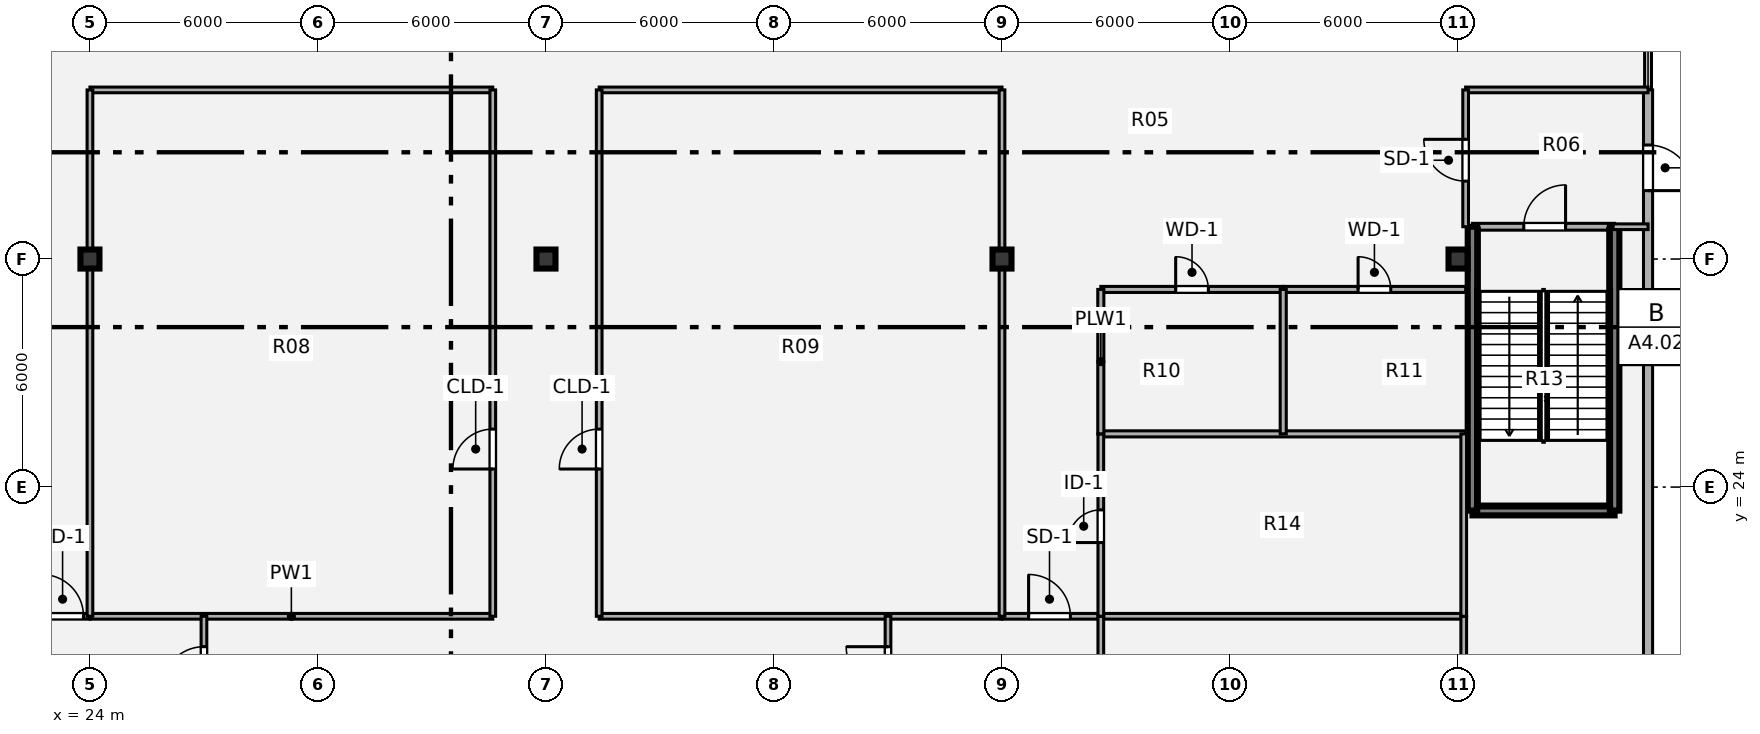
"""IFC4 building model, lengths in metres.
Left out: names, types, materials, properties, quantities, classifications, styles, units other than length and angle.
Written with IfcOpenShell. Run it as: python <this file> out.ifc"""

import sys

from ifc_helpers import new_model, si_unit, direction, frame, frame_2d, origin, origin_2d, place, context, subcontext, project, spatial, rectangle, i_section, extrude, source, transform, mapped, element, fill, save


model = new_model("IFC4")
c1 = context("Model", 3, precision=1e-05, world=origin(), true_north=direction((0.0, 1.0)))
c2 = subcontext(c1, "Body", "Model", "MODEL_VIEW")
j1 = project(units=[si_unit("LENGTHUNIT", "METRE"), si_unit("PLANEANGLEUNIT", "RADIAN")], contexts=[c1])
p1 = place(None, origin())
s1 = spatial("IfcSite", under=j1, at=p1, CompositionType="ELEMENT")
p2 = place(p1, origin())
s2 = spatial("IfcBuilding", under=s1, at=p2, CompositionType="ELEMENT")
p3 = place(p2, origin())
s3 = spatial("IfcBuildingStorey", under=s2, at=p3, CompositionType="ELEMENT", Elevation=0.0)
m1 = source(origin(), c2, "Body", "SweptSolid", [
    extrude(i_section(OverallWidth=0.5, OverallDepth=0.5, WebThickness=0.028, FlangeThickness=0.045, at=origin_2d()), origin(), (0.0, 0.0, 1.0), 5.4),
])
for number, where, z_axis, x_axis in (
    (1, (24.0, 30.0, 0.0), (0.0, 0.0, 1.0), (1.0, 0.0, 0.0)),
    (2, (36.0, 30.0, 0.0), (0.0, 0.0, 1.0), (1.0, 0.0, 0.0)),
    (3, (48.0, 30.0, 0.0), (0.0, 0.0, 1.0), (1.0, 0.0, 0.0)),
    (4, (60.0, 30.0, 0.0), (0.0, 0.0, 1.0), (1.0, 0.0, 0.0)),
):
    element("IfcColumn", number, at=place(p3, frame(where, z_axis=z_axis, x_axis=x_axis)), inside=s3, PredefinedType="COLUMN", context=c2, shape_type="MappedRepresentation", body=[
        mapped(m1, transform((0.0, 0.0, 0.0), x_axis=(1.0, 0.0, 0.0), y_axis=(0.0, 1.0, 0.0), z_axis=(0.0, 0.0, 1.0), scale=1.0)),
    ])
p4 = place(p3, frame((65.0, 34.45, 0.0), z_axis=(0.0, 0.0, 1.0), x_axis=(0.0, -1.0, 0.0)))
e5 = element("IfcWall", 5, at=p4, inside=s3, PredefinedType="SOLIDWALL", context=c2, shape_type="SweptSolid", body=[
    extrude(rectangle(XDim=28.85, YDim=0.24, at=frame_2d((14.425, 0.0))), origin(), (0.0, 0.0, 1.0), 5.12),
])
p5 = place(p4, frame((1.45, 0.0, 0.0)))
e6 = element("IfcOpeningElement", 6, at=p5, cuts=e5, PredefinedType="OPENING", context=c2, shape_type="SweptSolid", body=[
    extrude(rectangle(XDim=1.2, YDim=2.2, at=origin_2d()), frame((0.6, 0.13, 1.1), z_axis=(0.0, -1.0, 0.0), x_axis=(1.0, 0.0, 0.0)), (0.0, 0.0, 1.0), 0.26),
])
p6 = place(p3, frame((60.38, 30.85, 0.0), z_axis=(0.0, 0.0, 1.0), x_axis=(1.0, 0.0, 0.0)))
e7 = element("IfcWall", 7, at=p6, inside=s3, PredefinedType="PARTITIONING", context=c2, shape_type="SweptSolid", body=[
    extrude(rectangle(XDim=3.74, YDim=0.18, at=frame_2d((1.87, 0.0))), origin(), (0.0, 0.0, 1.0), 5.12),
])
p7 = place(p6, frame((1.35, 0.0, 0.0)))
e8 = element("IfcOpeningElement", 8, at=p7, cuts=e7, PredefinedType="OPENING", context=c2, shape_type="SweptSolid", body=[
    extrude(rectangle(XDim=1.1, YDim=2.1, at=origin_2d()), frame((0.55, 0.1, 1.05), z_axis=(0.0, -1.0, 0.0), x_axis=(1.0, 0.0, 0.0)), (0.0, 0.0, 1.0), 0.2),
])
p8 = place(p3, frame((60.38, 23.38, 0.0), z_axis=(0.0, 0.0, 1.0), x_axis=(1.0, 0.0, 0.0)))
e9 = element("IfcWall", 9, at=p8, inside=s3, PredefinedType="SHEAR", context=c2, shape_type="SweptSolid", body=[
    extrude(rectangle(XDim=3.74, YDim=0.25, at=frame_2d((1.87, 0.0))), origin(), (0.0, 0.0, 1.0), 5.4),
])
for number, where, z_axis, x_axis in (
    (10, (60.38, 23.38, 0.0), (0.0, 0.0, 1.0), (0.0, 1.0, 0.0)),
    (11, (64.12, 23.38, 0.0), (0.0, 0.0, 1.0), (0.0, 1.0, 0.0)),
):
    element("IfcWall", number, at=place(p3, frame(where, z_axis=z_axis, x_axis=x_axis)), inside=s3, PredefinedType="SHEAR", context=c2, shape_type="SweptSolid", body=[
        extrude(rectangle(XDim=7.47, YDim=0.25, at=frame_2d((3.735, 0.0))), origin(), (0.0, 0.0, 1.0), 5.4),
    ])
p9 = place(p3, frame((19.45, 20.6, 0.0), z_axis=(0.0, 0.0, 1.0), x_axis=(1.0, 0.0, 0.0)))
e12 = element("IfcWall", 12, at=p9, inside=s3, PredefinedType="PARTITIONING", context=c2, shape_type="SweptSolid", body=[
    extrude(rectangle(XDim=4.55, YDim=0.15, at=frame_2d((2.275, 0.0))), origin(), (0.0, 0.0, 1.0), 3.579),
])
p10 = place(p9, frame((3.28, 0.0, 0.0)))
e13 = element("IfcOpeningElement", 13, at=p10, cuts=e12, PredefinedType="OPENING", context=c2, shape_type="SweptSolid", body=[
    extrude(rectangle(XDim=1.1, YDim=2.1, at=origin_2d()), frame((0.55, 0.085, 1.05), z_axis=(0.0, -1.0, 0.0), x_axis=(1.0, 0.0, 0.0)), (0.0, 0.0, 1.0), 0.17),
])
for number, where, z_axis, x_axis in (
    (14, (24.0, 20.6, 0.0), (0.0, 0.0, 1.0), (1.0, 0.0, 0.0)),
    (15, (37.4, 20.6, 0.0), (0.0, 0.0, 1.0), (1.0, 0.0, 0.0)),
):
    element("IfcWall", number, at=place(p3, frame(where, z_axis=z_axis, x_axis=x_axis)), inside=s3, PredefinedType="PARTITIONING", context=c2, shape_type="SweptSolid", body=[
        extrude(rectangle(XDim=10.6, YDim=0.15, at=frame_2d((5.3, 0.0))), origin(), (0.0, 0.0, 1.0), 5.09),
    ])
p11 = place(p3, frame((48.0, 20.6, 0.0), z_axis=(0.0, 0.0, 1.0), x_axis=(1.0, 0.0, 0.0)))
e16 = element("IfcWall", 16, at=p11, inside=s3, PredefinedType="PARTITIONING", context=c2, shape_type="SweptSolid", body=[
    extrude(rectangle(XDim=2.6, YDim=0.15, at=frame_2d((1.3, 0.0))), origin(), (0.0, 0.0, 1.0), 5.09),
])
p12 = place(p11, frame((0.7, 0.0, 0.0)))
e17 = element("IfcOpeningElement", 17, at=p12, cuts=e16, PredefinedType="OPENING", context=c2, shape_type="SweptSolid", body=[
    extrude(rectangle(XDim=1.1, YDim=2.1, at=origin_2d()), frame((0.55, 0.085, 1.05), z_axis=(0.0, -1.0, 0.0), x_axis=(1.0, 0.0, 0.0)), (0.0, 0.0, 1.0), 0.17),
])
p13 = place(p3, frame((50.6, 20.6, 0.0), z_axis=(0.0, 0.0, 1.0), x_axis=(1.0, 0.0, 0.0)))
e18 = element("IfcWall", 18, at=p13, inside=s3, PredefinedType="PARTITIONING", context=c2, shape_type="SweptSolid", body=[
    extrude(rectangle(XDim=9.55, YDim=0.15, at=frame_2d((4.775, 0.0))), origin(), (0.0, 0.0, 1.0), 5.09),
])
p14 = place(p3, frame((50.6, 25.4, 0.0), z_axis=(0.0, 0.0, 1.0), x_axis=(1.0, 0.0, 0.0)))
e19 = element("IfcWall", 19, at=p14, inside=s3, PredefinedType="PLUMBINGWALL", context=c2, shape_type="SweptSolid", body=[
    extrude(rectangle(XDim=9.6, YDim=0.16, at=frame_2d((4.8, 0.0))), origin(), (0.0, 0.0, 1.0), 5.09),
])
p15 = place(p3, frame((50.6, 29.2, 0.0), z_axis=(0.0, 0.0, 1.0), x_axis=(1.0, 0.0, 0.0)))
e20 = element("IfcWall", 20, at=p15, inside=s3, PredefinedType="PLUMBINGWALL", context=c2, shape_type="SweptSolid", body=[
    extrude(rectangle(XDim=4.8, YDim=0.16, at=frame_2d((2.4, 0.0))), origin(), (0.0, 0.0, 1.0), 5.09),
])
p16 = place(p15, frame((1.97, 0.0, 0.0)))
e21 = element("IfcOpeningElement", 21, at=p16, cuts=e20, PredefinedType="OPENING", context=c2, shape_type="SweptSolid", body=[
    extrude(rectangle(XDim=0.86, YDim=2.1, at=origin_2d()), frame((0.43, 0.09, 1.05), z_axis=(0.0, -1.0, 0.0), x_axis=(1.0, 0.0, 0.0)), (0.0, 0.0, 1.0), 0.18),
])
p17 = place(p3, frame((55.4, 29.2, 0.0), z_axis=(0.0, 0.0, 1.0), x_axis=(1.0, 0.0, 0.0)))
e22 = element("IfcWall", 22, at=p17, inside=s3, PredefinedType="PLUMBINGWALL", context=c2, shape_type="SweptSolid", body=[
    extrude(rectangle(XDim=4.8, YDim=0.16, at=frame_2d((2.4, 0.0))), origin(), (0.0, 0.0, 1.0), 5.09),
])
p18 = place(p17, frame((1.97, 0.0, 0.0)))
e23 = element("IfcOpeningElement", 23, at=p18, cuts=e22, PredefinedType="OPENING", context=c2, shape_type="SweptSolid", body=[
    extrude(rectangle(XDim=0.86, YDim=2.1, at=origin_2d()), frame((0.43, 0.09, 1.05), z_axis=(0.0, -1.0, 0.0), x_axis=(1.0, 0.0, 0.0)), (0.0, 0.0, 1.0), 0.18),
])
p19 = place(p3, frame((64.08, 30.85, 0.0), z_axis=(0.0, 0.0, 1.0), x_axis=(1.0, 0.0, 0.0)))
e24 = element("IfcWall", 24, at=p19, inside=s3, PredefinedType="PARTITIONING", context=c2, shape_type="SweptSolid", body=[
    extrude(rectangle(XDim=0.92, YDim=0.15, at=frame_2d((0.46, 0.0))), origin(), (0.0, 0.0, 1.0), 5.09),
])
for number, where, z_axis, x_axis in (
    (25, (24.0, 34.45, 0.0), (0.0, 0.0, 1.0), (1.0, 0.0, 0.0)),
    (26, (37.4, 34.45, 0.0), (0.0, 0.0, 1.0), (1.0, 0.0, 0.0)),
):
    element("IfcWall", number, at=place(p3, frame(where, z_axis=z_axis, x_axis=x_axis)), inside=s3, PredefinedType="PARTITIONING", context=c2, shape_type="SweptSolid", body=[
        extrude(rectangle(XDim=10.6, YDim=0.15, at=frame_2d((5.3, 0.0))), origin(), (0.0, 0.0, 1.0), 5.09),
    ])
p20 = place(p3, frame((60.2, 34.45, 0.0), z_axis=(0.0, 0.0, 1.0), x_axis=(1.0, 0.0, 0.0)))
e27 = element("IfcWall", 27, at=p20, inside=s3, PredefinedType="PARTITIONING", context=c2, shape_type="SweptSolid", body=[
    extrude(rectangle(XDim=4.8, YDim=0.15, at=frame_2d((2.4, 0.0))), origin(), (0.0, 0.0, 1.0), 5.09),
])
p21 = place(p3, frame((24.0, 20.6, 0.0), z_axis=(0.0, 0.0, 1.0), x_axis=(0.0, 1.0, 0.0)))
e28 = element("IfcWall", 28, at=p21, inside=s3, PredefinedType="PARTITIONING", context=c2, shape_type="SweptSolid", body=[
    extrude(rectangle(XDim=13.85, YDim=0.15, at=frame_2d((6.925, 0.0))), origin(), (0.0, 0.0, 1.0), 4.305),
])
p22 = place(p3, frame((27.0, 18.0, 0.0), z_axis=(0.0, 0.0, 1.0), x_axis=(0.0, 1.0, 0.0)))
e29 = element("IfcWall", 29, at=p22, inside=s3, PredefinedType="PARTITIONING", context=c2, shape_type="SweptSolid", body=[
    extrude(rectangle(XDim=2.6, YDim=0.15, at=frame_2d((1.3, 0.0))), origin(), (0.0, 0.0, 1.0), 5.09),
])
p23 = place(p22, frame((0.7, 0.0, 0.0)))
e30 = element("IfcOpeningElement", 30, at=p23, cuts=e29, PredefinedType="OPENING", context=c2, shape_type="SweptSolid", body=[
    extrude(rectangle(XDim=1.1, YDim=2.1, at=origin_2d()), frame((0.55, 0.085, 1.05), z_axis=(0.0, -1.0, 0.0), x_axis=(1.0, 0.0, 0.0)), (0.0, 0.0, 1.0), 0.17),
])
p24 = place(p3, frame((34.6, 20.6, 0.0), z_axis=(0.0, 0.0, 1.0), x_axis=(0.0, 1.0, 0.0)))
e31 = element("IfcWall", 31, at=p24, inside=s3, PredefinedType="PARTITIONING", context=c2, shape_type="SweptSolid", body=[
    extrude(rectangle(XDim=13.85, YDim=0.15, at=frame_2d((6.925, 0.0))), origin(), (0.0, 0.0, 1.0), 4.746),
])
p25 = place(p24, frame((3.875, 0.0, 0.0)))
e32 = element("IfcOpeningElement", 32, at=p25, cuts=e31, PredefinedType="OPENING", context=c2, shape_type="SweptSolid", body=[
    extrude(rectangle(XDim=1.05, YDim=2.1, at=origin_2d()), frame((0.525, 0.085, 1.05), z_axis=(0.0, -1.0, 0.0), x_axis=(1.0, 0.0, 0.0)), (0.0, 0.0, 1.0), 0.17),
])
p26 = place(p3, frame((37.4, 20.6, 0.0), z_axis=(0.0, 0.0, 1.0), x_axis=(0.0, 1.0, 0.0)))
e33 = element("IfcWall", 33, at=p26, inside=s3, PredefinedType="PARTITIONING", context=c2, shape_type="SweptSolid", body=[
    extrude(rectangle(XDim=13.85, YDim=0.15, at=frame_2d((6.925, 0.0))), origin(), (0.0, 0.0, 1.0), 4.746),
])
p27 = place(p26, frame((3.875, 0.0, 0.0)))
e34 = element("IfcOpeningElement", 34, at=p27, cuts=e33, PredefinedType="OPENING", context=c2, shape_type="SweptSolid", body=[
    extrude(rectangle(XDim=1.05, YDim=2.1, at=origin_2d()), frame((0.525, 0.085, 1.05), z_axis=(0.0, -1.0, 0.0), x_axis=(1.0, 0.0, 0.0)), (0.0, 0.0, 1.0), 0.17),
])
p28 = place(p3, frame((45.0, 18.0, 0.0), z_axis=(0.0, 0.0, 1.0), x_axis=(0.0, 1.0, 0.0)))
e35 = element("IfcWall", 35, at=p28, inside=s3, PredefinedType="PARTITIONING", context=c2, shape_type="SweptSolid", body=[
    extrude(rectangle(XDim=2.6, YDim=0.15, at=frame_2d((1.3, 0.0))), origin(), (0.0, 0.0, 1.0), 4.746),
])
p29 = place(p28, frame((0.7, 0.0, 0.0)))
e36 = element("IfcOpeningElement", 36, at=p29, cuts=e35, PredefinedType="OPENING", context=c2, shape_type="SweptSolid", body=[
    extrude(rectangle(XDim=1.1, YDim=2.1, at=origin_2d()), frame((0.55, 0.085, 1.05), z_axis=(0.0, -1.0, 0.0), x_axis=(1.0, 0.0, 0.0)), (0.0, 0.0, 1.0), 0.17),
])
p30 = place(p3, frame((48.0, 20.6, 0.0), z_axis=(0.0, 0.0, 1.0), x_axis=(0.0, 1.0, 0.0)))
e37 = element("IfcWall", 37, at=p30, inside=s3, PredefinedType="PARTITIONING", context=c2, shape_type="SweptSolid", body=[
    extrude(rectangle(XDim=13.85, YDim=0.15, at=frame_2d((6.925, 0.0))), origin(), (0.0, 0.0, 1.0), 4.305),
])
p31 = place(p3, frame((50.6, 2.48, 0.0), z_axis=(0.0, 0.0, 1.0), x_axis=(0.0, 1.0, 0.0)))
e38 = element("IfcWall", 38, at=p31, inside=s3, PredefinedType="PARTITIONING", context=c2, shape_type="SweptSolid", body=[
    extrude(rectangle(XDim=18.12, YDim=0.15, at=frame_2d((9.06, 0.0))), origin(), (0.0, 0.0, 1.0), 4.746),
])
p32 = place(p31, frame((13.87, 0.0, 0.0)))
e39 = element("IfcOpeningElement", 39, at=p32, cuts=e38, PredefinedType="OPENING", context=c2, shape_type="SweptSolid", body=[
    extrude(rectangle(XDim=1.1, YDim=2.1, at=origin_2d()), frame((0.55, 0.085, 1.05), z_axis=(0.0, -1.0, 0.0), x_axis=(1.0, 0.0, 0.0)), (0.0, 0.0, 1.0), 0.17),
])
p33 = place(p3, frame((50.6, 20.6, 0.0), z_axis=(0.0, 0.0, 1.0), x_axis=(0.0, 1.0, 0.0)))
e40 = element("IfcWall", 40, at=p33, inside=s3, PredefinedType="PARTITIONING", context=c2, shape_type="SweptSolid", body=[
    extrude(rectangle(XDim=4.8, YDim=0.15, at=frame_2d((2.4, 0.0))), origin(), (0.0, 0.0, 1.0), 4.746),
])
p34 = place(p33, frame((1.94, 0.0, 0.0)))
e41 = element("IfcOpeningElement", 41, at=p34, cuts=e40, PredefinedType="OPENING", context=c2, shape_type="SweptSolid", body=[
    extrude(rectangle(XDim=0.86, YDim=2.1, at=origin_2d()), frame((0.43, 0.085, 1.05), z_axis=(0.0, -1.0, 0.0), x_axis=(1.0, 0.0, 0.0)), (0.0, 0.0, 1.0), 0.17),
])
for number, where, z_axis, x_axis in (
    (42, (50.6, 25.4, 0.0), (0.0, 0.0, 1.0), (0.0, 1.0, 0.0)),
    (43, (55.4, 25.4, 0.0), (0.0, 0.0, 1.0), (0.0, 1.0, 0.0)),
):
    element("IfcWall", number, at=place(p3, frame(where, z_axis=z_axis, x_axis=x_axis)), inside=s3, PredefinedType="PLUMBINGWALL", context=c2, shape_type="SweptSolid", body=[
        extrude(rectangle(XDim=3.8, YDim=0.16, at=frame_2d((1.9, 0.0))), origin(), (0.0, 0.0, 1.0), 4.746),
    ])
p35 = place(p3, frame((60.15, 2.48, 0.0), z_axis=(0.0, 0.0, 1.0), x_axis=(0.0, 1.0, 0.0)))
e44 = element("IfcWall", 44, at=p35, inside=s3, PredefinedType="PARTITIONING", context=c2, shape_type="SweptSolid", body=[
    extrude(rectangle(XDim=18.12, YDim=0.15, at=frame_2d((9.06, 0.0))), origin(), (0.0, 0.0, 1.0), 4.305),
])
p36 = place(p3, frame((60.15, 20.6, 0.0), z_axis=(0.0, 0.0, 1.0), x_axis=(0.0, 1.0, 0.0)))
e45 = element("IfcWall", 45, at=p36, inside=s3, PredefinedType="PARTITIONING", context=c2, shape_type="SweptSolid", body=[
    extrude(rectangle(XDim=4.8, YDim=0.15, at=frame_2d((2.4, 0.0))), origin(), (0.0, 0.0, 1.0), 4.305),
])
p37 = place(p3, frame((60.2, 30.85, 0.0), z_axis=(0.0, 0.0, 1.0), x_axis=(0.0, 1.0, 0.0)))
e46 = element("IfcWall", 46, at=p37, inside=s3, PredefinedType="PARTITIONING", context=c2, shape_type="SweptSolid", body=[
    extrude(rectangle(XDim=3.6, YDim=0.15, at=frame_2d((1.8, 0.0))), origin(), (0.0, 0.0, 1.0), 4.305),
])
p38 = place(p37, frame((1.2, 0.0, 0.0)))
e47 = element("IfcOpeningElement", 47, at=p38, cuts=e46, PredefinedType="OPENING", context=c2, shape_type="SweptSolid", body=[
    extrude(rectangle(XDim=1.1, YDim=2.1, at=origin_2d()), frame((0.55, 0.085, 1.05), z_axis=(0.0, -1.0, 0.0), x_axis=(1.0, 0.0, 0.0)), (0.0, 0.0, 1.0), 0.17),
])
m2 = source(origin(), c2, "Body", "SweptSolid", [
    extrude(rectangle(XDim=1.2, YDim=2.2, at=origin_2d()), frame((0.6, 0.025, 1.1), z_axis=(0.0, -1.0, 0.0), x_axis=(1.0, 0.0, 0.0)), (0.0, 0.0, 1.0), 0.05),
])
p39 = place(p5, origin())
e48 = element("IfcDoor", 48, at=p39, inside=s3, OperationType="SINGLE_SWING_RIGHT", PredefinedType="DOOR", context=c2, shape_type="MappedRepresentation", body=[
    mapped(m2, transform((0.0, 0.0, 0.0), x_axis=(1.0, 0.0, 0.0), y_axis=(0.0, 1.0, 0.0), z_axis=(0.0, 0.0, 1.0), scale=1.0)),
])
fill(e6, e48)
m3 = source(origin(), c2, "Body", "SweptSolid", [
    extrude(rectangle(XDim=1.1, YDim=2.1, at=origin_2d()), frame((0.55, 0.025, 1.05), z_axis=(0.0, -1.0, 0.0), x_axis=(1.0, 0.0, 0.0)), (0.0, 0.0, 1.0), 0.05),
])
p40 = place(p7, origin())
e49 = element("IfcDoor", 49, at=p40, inside=s3, OperationType="SINGLE_SWING_RIGHT", PredefinedType="DOOR", context=c2, shape_type="MappedRepresentation", body=[
    mapped(m3, transform((0.0, 0.0, 0.0), x_axis=(1.0, 0.0, 0.0), y_axis=(0.0, 1.0, 0.0), z_axis=(0.0, 0.0, 1.0), scale=1.0)),
])
fill(e8, e49)
p41 = place(p10, origin())
e50 = element("IfcDoor", 50, at=p41, inside=s3, OperationType="SINGLE_SWING_LEFT", PredefinedType="DOOR", context=c2, shape_type="MappedRepresentation", body=[
    mapped(m3, transform((0.0, 0.0, 0.0), x_axis=(1.0, 0.0, 0.0), y_axis=(0.0, 1.0, 0.0), z_axis=(0.0, 0.0, 1.0), scale=1.0)),
])
fill(e13, e50)
p42 = place(p12, origin())
e51 = element("IfcDoor", 51, at=p42, inside=s3, OperationType="SINGLE_SWING_LEFT", PredefinedType="DOOR", context=c2, shape_type="MappedRepresentation", body=[
    mapped(m3, transform((0.0, 0.0, 0.0), x_axis=(1.0, 0.0, 0.0), y_axis=(0.0, 1.0, 0.0), z_axis=(0.0, 0.0, 1.0), scale=1.0)),
])
fill(e17, e51)
m4 = source(origin(), c2, "Body", "SweptSolid", [
    extrude(rectangle(XDim=0.86, YDim=2.1, at=origin_2d()), frame((0.43, 0.025, 1.05), z_axis=(0.0, -1.0, 0.0), x_axis=(1.0, 0.0, 0.0)), (0.0, 0.0, 1.0), 0.05),
])
p43 = place(p16, origin())
e52 = element("IfcDoor", 52, at=p43, inside=s3, OperationType="SINGLE_SWING_LEFT", PredefinedType="DOOR", context=c2, shape_type="MappedRepresentation", body=[
    mapped(m4, transform((0.0, 0.0, 0.0), x_axis=(1.0, 0.0, 0.0), y_axis=(0.0, 1.0, 0.0), z_axis=(0.0, 0.0, 1.0), scale=1.0)),
])
fill(e21, e52)
p44 = place(p18, origin())
e53 = element("IfcDoor", 53, at=p44, inside=s3, OperationType="SINGLE_SWING_LEFT", PredefinedType="DOOR", context=c2, shape_type="MappedRepresentation", body=[
    mapped(m4, transform((0.0, 0.0, 0.0), x_axis=(1.0, 0.0, 0.0), y_axis=(0.0, 1.0, 0.0), z_axis=(0.0, 0.0, 1.0), scale=1.0)),
])
fill(e23, e53)
p45 = place(p23, origin())
e54 = element("IfcDoor", 54, at=p45, inside=s3, OperationType="SINGLE_SWING_LEFT", PredefinedType="DOOR", context=c2, shape_type="MappedRepresentation", body=[
    mapped(m3, transform((0.0, 0.0, 0.0), x_axis=(1.0, 0.0, 0.0), y_axis=(0.0, 1.0, 0.0), z_axis=(0.0, 0.0, 1.0), scale=1.0)),
])
fill(e30, e54)
m5 = source(origin(), c2, "Body", "SweptSolid", [
    extrude(rectangle(XDim=1.05, YDim=2.1, at=origin_2d()), frame((0.525, 0.025, 1.05), z_axis=(0.0, -1.0, 0.0), x_axis=(1.0, 0.0, 0.0)), (0.0, 0.0, 1.0), 0.05),
])
p46 = place(p25, origin())
e55 = element("IfcDoor", 55, at=p46, inside=s3, OperationType="SINGLE_SWING_LEFT", PredefinedType="DOOR", context=c2, shape_type="MappedRepresentation", body=[
    mapped(m5, transform((0.0, 0.0, 0.0), x_axis=(1.0, 0.0, 0.0), y_axis=(0.0, 1.0, 0.0), z_axis=(0.0, 0.0, 1.0), scale=1.0)),
])
fill(e32, e55)
p47 = place(p27, origin())
e56 = element("IfcDoor", 56, at=p47, inside=s3, OperationType="SINGLE_SWING_LEFT", PredefinedType="DOOR", context=c2, shape_type="MappedRepresentation", body=[
    mapped(m5, transform((0.0, 0.0, 0.0), x_axis=(1.0, 0.0, 0.0), y_axis=(0.0, 1.0, 0.0), z_axis=(0.0, 0.0, 1.0), scale=1.0)),
])
fill(e34, e56)
p48 = place(p29, origin())
e57 = element("IfcDoor", 57, at=p48, inside=s3, OperationType="SINGLE_SWING_RIGHT", PredefinedType="DOOR", context=c2, shape_type="MappedRepresentation", body=[
    mapped(m3, transform((0.0, 0.0, 0.0), x_axis=(1.0, 0.0, 0.0), y_axis=(0.0, 1.0, 0.0), z_axis=(0.0, 0.0, 1.0), scale=1.0)),
])
fill(e36, e57)
m6 = source(origin(), c2, "Body", "SweptSolid", [
    extrude(rectangle(XDim=0.86, YDim=2.1, at=origin_2d()), frame((0.43, 0.025, 1.05), z_axis=(0.0, -1.0, 0.0), x_axis=(1.0, 0.0, 0.0)), (0.0, 0.0, 1.0), 0.05),
])
p49 = place(p34, origin())
e58 = element("IfcDoor", 58, at=p49, inside=s3, OperationType="SINGLE_SWING_LEFT", PredefinedType="DOOR", context=c2, shape_type="MappedRepresentation", body=[
    mapped(m6, transform((0.0, 0.0, 0.0), x_axis=(1.0, 0.0, 0.0), y_axis=(0.0, 1.0, 0.0), z_axis=(0.0, 0.0, 1.0), scale=1.0)),
])
fill(e41, e58)
p50 = place(p38, origin())
e59 = element("IfcDoor", 59, at=p50, inside=s3, OperationType="SINGLE_SWING_RIGHT", PredefinedType="DOOR", context=c2, shape_type="MappedRepresentation", body=[
    mapped(m3, transform((0.0, 0.0, 0.0), x_axis=(1.0, 0.0, 0.0), y_axis=(0.0, 1.0, 0.0), z_axis=(0.0, 0.0, 1.0), scale=1.0)),
])
fill(e47, e59)
save(model, sys.argv[1])
